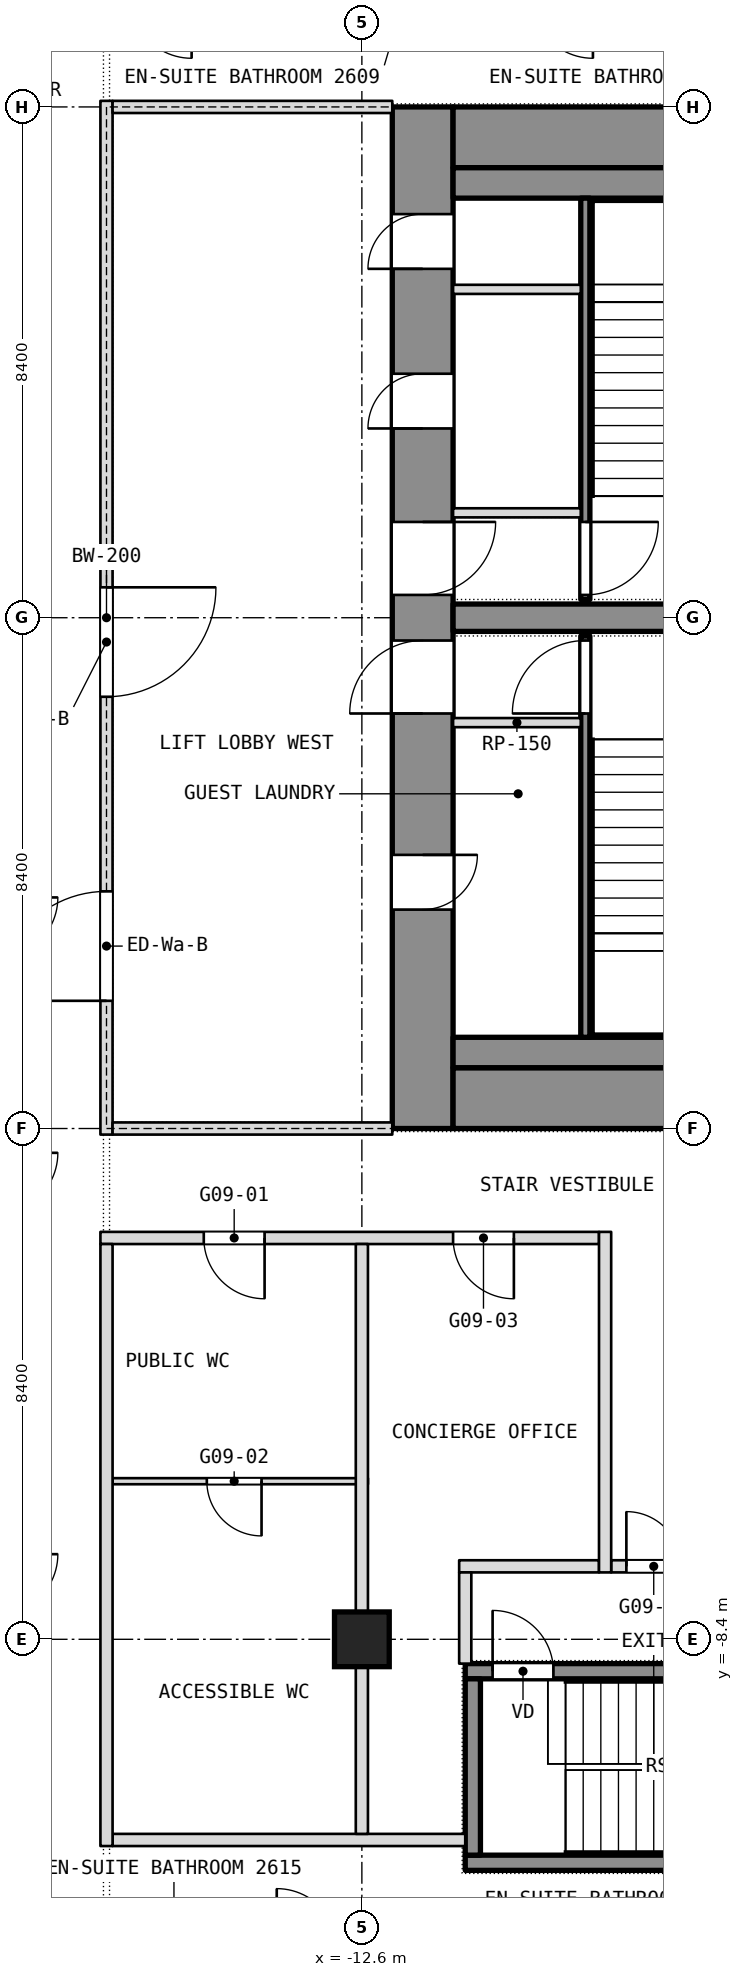
"""IFC4 building model, lengths in metres.
Left out: names, types, materials, properties, quantities, classifications, styles, units other than length and angle.
Written with IfcOpenShell. Run it as: python <this file> out.ifc"""

import sys

from ifc_helpers import new_model, si_unit, direction, frame, frame_2d, origin, origin_2d, place, context, subcontext, project, spatial, rectangle, extrude, element, fill, save


model = new_model("IFC4")
c1 = context("Model", 3, precision=1e-05, world=origin(), true_north=direction((0.0, 1.0)))
c2 = subcontext(c1, "Body", "Model", "MODEL_VIEW")
j1 = project(units=[si_unit("LENGTHUNIT", "METRE"), si_unit("PLANEANGLEUNIT", "RADIAN")], contexts=[c1])
p1 = place(None, origin())
s1 = spatial("IfcSite", under=j1, at=p1, CompositionType="ELEMENT")
p2 = place(p1, origin())
s2 = spatial("IfcBuilding", under=s1, at=p2, CompositionType="ELEMENT")
p3 = place(p2, frame((0.0, 0.0, 119.3)))
s3 = spatial("IfcBuildingStorey", under=s2, at=p3, CompositionType="ELEMENT", Elevation=119.3)
p4 = place(p3, frame((-11.6, 0.0, 0.0), z_axis=(0.0, 0.0, 1.0), x_axis=(0.0, 1.0, 0.0)))
e1 = element("IfcWall", 1, at=p4, inside=s3, PredefinedType="SHEAR", context=c2, shape_type="SweptSolid", body=[
    extrude(rectangle(XDim=16.8, YDim=1.0, at=frame_2d((8.4, 0.0))), origin(), (0.0, 0.0, 1.0), 3.6),
])
p5 = place(p4, frame((3.6, 0.0, 0.0)))
e2 = element("IfcOpeningElement", 2, at=p5, cuts=e1, PredefinedType="OPENING", context=c2, shape_type="SweptSolid", body=[
    extrude(rectangle(XDim=0.9, YDim=2.1, at=frame_2d((0.45, 1.05))), frame((0.0, 0.5, 0.0), z_axis=(0.0, -1.0, 0.0), x_axis=(1.0, 0.0, 0.0)), (0.0, 0.0, 1.0), 1.0),
])
p6 = place(p4, frame((6.825, 0.0, 0.0)))
e3 = element("IfcOpeningElement", 3, at=p6, cuts=e1, PredefinedType="OPENING", context=c2, shape_type="SweptSolid", body=[
    extrude(rectangle(XDim=1.2, YDim=2.1, at=frame_2d((0.6, 1.05))), frame((0.0, 0.5, 0.0), z_axis=(0.0, -1.0, 0.0), x_axis=(1.0, 0.0, 0.0)), (0.0, 0.0, 1.0), 1.0),
])
p7 = place(p4, frame((14.137, 0.0, 0.0)))
e4 = element("IfcOpeningElement", 4, at=p7, cuts=e1, PredefinedType="OPENING", context=c2, shape_type="SweptSolid", body=[
    extrude(rectangle(XDim=0.9, YDim=2.1, at=frame_2d((0.45, 1.05))), frame((0.0, 0.5, 0.0), z_axis=(0.0, -1.0, 0.0), x_axis=(1.0, 0.0, 0.0)), (0.0, 0.0, 1.0), 1.0),
])
p8 = place(p4, frame((11.512, 0.0, 0.0)))
e5 = element("IfcOpeningElement", 5, at=p8, cuts=e1, PredefinedType="OPENING", context=c2, shape_type="SweptSolid", body=[
    extrude(rectangle(XDim=0.9, YDim=2.1, at=frame_2d((0.45, 1.05))), frame((0.0, 0.5, 0.0), z_axis=(0.0, -1.0, 0.0), x_axis=(1.0, 0.0, 0.0)), (0.0, 0.0, 1.0), 1.0),
])
p9 = place(p4, frame((8.775, 0.0, 0.0)))
e6 = element("IfcOpeningElement", 6, at=p9, cuts=e1, PredefinedType="OPENING", context=c2, shape_type="SweptSolid", body=[
    extrude(rectangle(XDim=1.2, YDim=2.1, at=frame_2d((0.6, 1.05))), frame((0.0, 0.5, 0.0), z_axis=(0.0, -1.0, 0.0), x_axis=(1.0, 0.0, 0.0)), (0.0, 0.0, 1.0), 1.0),
])
for number, where, z_axis, x_axis in (
    (7, (-11.1, 0.5, 0.0), (0.0, 0.0, 1.0), (1.0, 0.0, 0.0)),
    (8, (-11.1, 16.3, 0.0), (0.0, 0.0, 1.0), (1.0, 0.0, 0.0)),
):
    element("IfcWall", number, at=place(p3, frame(where, z_axis=z_axis, x_axis=x_axis)), inside=s3, PredefinedType="SHEAR", context=c2, shape_type="SweptSolid", body=[
        extrude(rectangle(XDim=22.2, YDim=1.0, at=frame_2d((11.1, 0.0))), origin(), (0.0, 0.0, 1.0), 3.6),
    ])
p10 = place(p3, frame((-11.1, 8.4, 0.0), z_axis=(0.0, 0.0, 1.0), x_axis=(1.0, 0.0, 0.0)))
e9 = element("IfcWall", 9, at=p10, inside=s3, PredefinedType="SHEAR", context=c2, shape_type="SweptSolid", body=[
    extrude(rectangle(XDim=6.675, YDim=0.45, at=frame_2d((3.337, 0.0))), origin(), (0.0, 0.0, 1.0), 3.6),
])
p11 = place(p3, frame((-12.6, -8.4, 0.0), z_axis=(0.0, 0.0, 1.0), x_axis=(1.0, 0.0, 0.0)))
e10 = element("IfcColumn", 10, at=p11, inside=s3, PredefinedType="COLUMN", context=c2, shape_type="SweptSolid", body=[
    extrude(rectangle(XDim=0.9, YDim=0.9, at=origin_2d()), origin(), (0.0, 0.0, 1.0), 3.6),
])
p12 = place(p3, frame((-16.7, -11.7, 0.0), z_axis=(0.0, 0.0, 1.0), x_axis=(1.0, 0.0, 0.0)))
e11 = element("IfcWall", 11, at=p12, inside=s3, PredefinedType="PARTITIONING", context=c2, shape_type="SweptSolid", body=[
    extrude(rectangle(XDim=5.8, YDim=0.2, at=frame_2d((2.9, 0.0))), origin(), (0.0, 0.0, 1.0), 3.34),
])
p13 = place(p3, frame((-11.0, -7.2, 0.0), z_axis=(0.0, 0.0, 1.0), x_axis=(1.0, 0.0, 0.0)))
e12 = element("IfcWall", 12, at=p13, inside=s3, PredefinedType="PARTITIONING", context=c2, shape_type="SweptSolid", body=[
    extrude(rectangle(XDim=2.3, YDim=0.2, at=frame_2d((1.15, 0.0))), origin(), (0.0, 0.0, 1.0), 3.34),
])
p14 = place(p3, frame((-8.5, -7.2, 0.0), z_axis=(0.0, 0.0, 1.0), x_axis=(1.0, 0.0, 0.0)))
e13 = element("IfcWall", 13, at=p14, inside=s3, PredefinedType="PARTITIONING", context=c2, shape_type="SweptSolid", body=[
    extrude(rectangle(XDim=3.7, YDim=0.2, at=frame_2d((1.85, 0.0))), origin(), (0.0, 0.0, 1.0), 3.34),
])
p15 = place(p14, frame((0.25, 0.0, 0.0)))
e14 = element("IfcOpeningElement", 14, at=p15, cuts=e13, PredefinedType="OPENING", context=c2, shape_type="SweptSolid", body=[
    extrude(rectangle(XDim=0.9, YDim=2.1, at=frame_2d((0.45, 1.05))), frame((0.0, 0.1, 0.0), z_axis=(0.0, -1.0, 0.0), x_axis=(1.0, 0.0, 0.0)), (0.0, 0.0, 1.0), 0.2),
])
p16 = place(p3, frame((-16.7, -5.8, 0.0), z_axis=(0.0, 0.0, 1.0), x_axis=(1.0, 0.0, 0.0)))
e15 = element("IfcWall", 15, at=p16, inside=s3, PredefinedType="PARTITIONING", context=c2, shape_type="SweptSolid", body=[
    extrude(rectangle(XDim=4.2, YDim=0.1, at=frame_2d((2.1, 0.0))), origin(), (0.0, 0.0, 1.0), 3.34),
])
p17 = place(p16, frame((1.55, 0.0, 0.0)))
e16 = element("IfcOpeningElement", 16, at=p17, cuts=e15, PredefinedType="OPENING", context=c2, shape_type="SweptSolid", body=[
    extrude(rectangle(XDim=0.9, YDim=2.1, at=frame_2d((0.45, 1.05))), frame((0.0, 0.05, 0.0), z_axis=(0.0, -1.0, 0.0), x_axis=(1.0, 0.0, 0.0)), (0.0, 0.0, 1.0), 0.1),
])
p18 = place(p3, frame((-16.9, -1.8, 0.0), z_axis=(0.0, 0.0, 1.0), x_axis=(1.0, 0.0, 0.0)))
e17 = element("IfcWall", 17, at=p18, inside=s3, PredefinedType="PARTITIONING", context=c2, shape_type="SweptSolid", body=[
    extrude(rectangle(XDim=8.2, YDim=0.2, at=frame_2d((4.1, 0.0))), origin(), (0.0, 0.0, 1.0), 3.34),
])
p19 = place(p18, frame((1.7, 0.0, 0.0)))
e18 = element("IfcOpeningElement", 18, at=p19, cuts=e17, PredefinedType="OPENING", context=c2, shape_type="SweptSolid", body=[
    extrude(rectangle(XDim=1.0, YDim=2.1, at=frame_2d((0.5, 1.05))), frame((0.0, 0.1, 0.0), z_axis=(0.0, -1.0, 0.0), x_axis=(1.0, 0.0, 0.0)), (0.0, 0.0, 1.0), 0.2),
])
p20 = place(p18, frame((5.8, 0.0, 0.0)))
e19 = element("IfcOpeningElement", 19, at=p20, cuts=e17, PredefinedType="OPENING", context=c2, shape_type="SweptSolid", body=[
    extrude(rectangle(XDim=1.0, YDim=2.1, at=frame_2d((0.5, 1.05))), frame((0.0, 0.1, 0.0), z_axis=(0.0, -1.0, 0.0), x_axis=(1.0, 0.0, 0.0)), (0.0, 0.0, 1.0), 0.2),
])
p21 = place(p3, frame((-8.6, -7.3, 0.0), z_axis=(0.0, 0.0, 1.0), x_axis=(0.0, 1.0, 0.0)))
e20 = element("IfcWall", 20, at=p21, inside=s3, PredefinedType="PARTITIONING", context=c2, shape_type="SweptSolid", body=[
    extrude(rectangle(XDim=5.6, YDim=0.2, at=frame_2d((2.8, 0.0))), origin(), (0.0, 0.0, 1.0), 3.34),
])
p22 = place(p3, frame((-10.9, -8.8, 0.0), z_axis=(0.0, 0.0, 1.0), x_axis=(0.0, 1.0, 0.0)))
e21 = element("IfcWall", 21, at=p22, inside=s3, PredefinedType="PARTITIONING", context=c2, shape_type="SweptSolid", body=[
    extrude(rectangle(XDim=1.5, YDim=0.2, at=frame_2d((0.75, 0.0))), origin(), (0.0, 0.0, 1.0), 3.34),
])
p23 = place(p3, frame((-12.6, -11.6, 0.0), z_axis=(0.0, 0.0, 1.0), x_axis=(0.0, 1.0, 0.0)))
e22 = element("IfcWall", 22, at=p23, inside=s3, PredefinedType="PARTITIONING", context=c2, shape_type="SweptSolid", body=[
    extrude(rectangle(XDim=9.7, YDim=0.2, at=frame_2d((4.85, 0.0))), origin(), (0.0, 0.0, 1.0), 3.34),
])
p24 = place(p3, frame((-16.8, -11.8, 0.0), z_axis=(0.0, 0.0, 1.0), x_axis=(0.0, 1.0, 0.0)))
e23 = element("IfcWall", 23, at=p24, inside=s3, PredefinedType="PARTITIONING", context=c2, shape_type="SweptSolid", body=[
    extrude(rectangle(XDim=9.9, YDim=0.2, at=frame_2d((4.95, 0.0))), origin(), (0.0, 0.0, 1.0), 3.34),
])
for number, where, z_axis, x_axis in (
    (24, (-11.1, 1.25, 0.0), (0.0, 0.0, 1.0), (1.0, 0.0, 0.0)),
    (25, (-11.1, 15.55, 0.0), (0.0, 0.0, 1.0), (1.0, 0.0, 0.0)),
):
    element("IfcWall", number, at=place(p3, frame(where, z_axis=z_axis, x_axis=x_axis)), inside=s3, PredefinedType="PARTITIONING", context=c2, shape_type="SweptSolid", body=[
        extrude(rectangle(XDim=22.2, YDim=0.5, at=frame_2d((11.1, 0.0))), origin(), (0.0, 0.0, 1.0), 3.34),
    ])
p25 = place(p3, frame((-8.925, 1.5, 0.0), z_axis=(0.0, 0.0, 1.0), x_axis=(0.0, 1.0, 0.0)))
e26 = element("IfcWall", 26, at=p25, inside=s3, PredefinedType="SHEAR", context=c2, shape_type="SweptSolid", body=[
    extrude(rectangle(XDim=6.6, YDim=0.15, at=frame_2d((3.3, 0.0))), origin(), (0.0, 0.0, 1.0), 3.34),
])
p26 = place(p25, frame((5.325, 0.0, 0.0)))
e27 = element("IfcOpeningElement", 27, at=p26, cuts=e26, PredefinedType="OPENING", context=c2, shape_type="SweptSolid", body=[
    extrude(rectangle(XDim=1.2, YDim=2.1, at=frame_2d((0.6, 1.05))), frame((0.0, 0.075, 0.0), z_axis=(0.0, -1.0, 0.0), x_axis=(1.0, 0.0, 0.0)), (0.0, 0.0, 1.0), 0.15),
])
p27 = place(p3, frame((-11.1, 6.675, 0.0), z_axis=(0.0, 0.0, 1.0), x_axis=(1.0, 0.0, 0.0)))
e28 = element("IfcWall", 28, at=p27, inside=s3, PredefinedType="PARTITIONING", context=c2, shape_type="SweptSolid", body=[
    extrude(rectangle(XDim=2.1, YDim=0.15, at=frame_2d((1.05, 0.0))), origin(), (0.0, 0.0, 1.0), 3.34),
])
p28 = place(p3, frame((-8.925, 8.7, 0.0), z_axis=(0.0, 0.0, 1.0), x_axis=(0.0, 1.0, 0.0)))
e29 = element("IfcWall", 29, at=p28, inside=s3, PredefinedType="SHEAR", context=c2, shape_type="SweptSolid", body=[
    extrude(rectangle(XDim=6.6, YDim=0.15, at=frame_2d((3.3, 0.0))), origin(), (0.0, 0.0, 1.0), 3.34),
])
p29 = place(p28, frame((0.075, 0.0, 0.0)))
e30 = element("IfcOpeningElement", 30, at=p29, cuts=e29, PredefinedType="OPENING", context=c2, shape_type="SweptSolid", body=[
    extrude(rectangle(XDim=1.2, YDim=2.1, at=frame_2d((0.6, 1.05))), frame((0.0, 0.075, 0.0), z_axis=(0.0, -1.0, 0.0), x_axis=(1.0, 0.0, 0.0)), (0.0, 0.0, 1.0), 0.15),
])
for number, where, z_axis, x_axis in (
    (31, (-11.1, 10.125, 0.0), (0.0, 0.0, 1.0), (1.0, 0.0, 0.0)),
    (32, (-11.1, 13.8, 0.0), (0.0, 0.0, 1.0), (1.0, 0.0, 0.0)),
):
    element("IfcWall", number, at=place(p3, frame(where, z_axis=z_axis, x_axis=x_axis)), inside=s3, PredefinedType="PARTITIONING", context=c2, shape_type="SweptSolid", body=[
        extrude(rectangle(XDim=2.1, YDim=0.15, at=frame_2d((1.05, 0.0))), origin(), (0.0, 0.0, 1.0), 3.34),
    ])
p30 = place(p3, frame((-16.8, -0.1, 0.0), z_axis=(0.0, 0.0, 1.0), x_axis=(0.0, 1.0, 0.0)))
e33 = element("IfcWall", 33, at=p30, inside=s3, PredefinedType="PARTITIONING", context=c2, shape_type="SweptSolid", body=[
    extrude(rectangle(XDim=17.0, YDim=0.2, at=frame_2d((8.5, 0.0))), origin(), (0.0, 0.0, 1.0), 3.34),
])
p31 = place(p30, frame((2.2, 0.0, 0.0)))
e34 = element("IfcOpeningElement", 34, at=p31, cuts=e33, PredefinedType="OPENING", context=c2, shape_type="SweptSolid", body=[
    extrude(rectangle(XDim=1.8, YDim=2.1, at=frame_2d((0.9, 1.05))), frame((0.0, 0.1, 0.0), z_axis=(0.0, -1.0, 0.0), x_axis=(1.0, 0.0, 0.0)), (0.0, 0.0, 1.0), 0.2),
])
p32 = place(p30, frame((7.2, 0.0, 0.0)))
e35 = element("IfcOpeningElement", 35, at=p32, cuts=e33, PredefinedType="OPENING", context=c2, shape_type="SweptSolid", body=[
    extrude(rectangle(XDim=1.8, YDim=2.1, at=frame_2d((0.9, 1.05))), frame((0.0, 0.1, 0.0), z_axis=(0.0, -1.0, 0.0), x_axis=(1.0, 0.0, 0.0)), (0.0, 0.0, 1.0), 0.2),
])
for number, where, z_axis, x_axis in (
    (36, (-16.7, 0.0, 0.0), (0.0, 0.0, 1.0), (1.0, 0.0, 0.0)),
    (37, (-16.7, 16.8, 0.0), (0.0, 0.0, 1.0), (1.0, 0.0, 0.0)),
):
    element("IfcWall", number, at=place(p3, frame(where, z_axis=z_axis, x_axis=x_axis)), inside=s3, PredefinedType="PARTITIONING", context=c2, shape_type="SweptSolid", body=[
        extrude(rectangle(XDim=4.6, YDim=0.2, at=frame_2d((2.3, 0.0))), origin(), (0.0, 0.0, 1.0), 2.89),
    ])
p33 = place(p3, frame((-10.9, -12.075, 0.1), z_axis=(0.0, 0.0, 1.0), x_axis=(1.0, 0.0, 0.0)))
e38 = element("IfcWall", 38, at=p33, inside=s3, PredefinedType="SHEAR", context=c2, shape_type="SweptSolid", body=[
    extrude(rectangle(XDim=6.2, YDim=0.25, at=frame_2d((3.1, 0.0))), origin(), (0.0, 0.0, 1.0), 3.6),
])
p34 = place(p3, frame((-10.9, -8.925, 0.1), z_axis=(0.0, 0.0, 1.0), x_axis=(1.0, 0.0, 0.0)))
e39 = element("IfcWall", 39, at=p34, inside=s3, PredefinedType="SHEAR", context=c2, shape_type="SweptSolid", body=[
    extrude(rectangle(XDim=6.2, YDim=0.25, at=frame_2d((3.1, 0.0))), origin(), (0.0, 0.0, 1.0), 3.6),
])
p35 = place(p34, frame((0.45, 0.0, 0.0)))
e40 = element("IfcOpeningElement", 40, at=p35, cuts=e39, PredefinedType="OPENING", context=c2, shape_type="SweptSolid", body=[
    extrude(rectangle(XDim=1.0, YDim=2.1, at=frame_2d((0.5, 1.05))), frame((0.0, 0.125, 0.0), z_axis=(0.0, -1.0, 0.0), x_axis=(1.0, 0.0, 0.0)), (0.0, 0.0, 1.0), 0.25),
])
p36 = place(p3, frame((-10.775, -11.95, 0.1), z_axis=(0.0, 0.0, 1.0), x_axis=(0.0, 1.0, 0.0)))
e41 = element("IfcWall", 41, at=p36, inside=s3, PredefinedType="SHEAR", context=c2, shape_type="SweptSolid", body=[
    extrude(rectangle(XDim=2.9, YDim=0.25, at=frame_2d((1.45, 0.0))), origin(), (0.0, 0.0, 1.0), 3.6),
])
p37 = place(p15, origin())
e42 = element("IfcDoor", 42, at=p37, inside=s3, OperationType="SINGLE_SWING_RIGHT", PredefinedType="DOOR", context=c2, shape_type="SweptSolid", body=[
    extrude(rectangle(XDim=0.9, YDim=2.1, at=frame_2d((0.45, 1.05))), frame((0.0, 0.025, 0.0), z_axis=(0.0, -1.0, 0.0), x_axis=(1.0, 0.0, 0.0)), (0.0, 0.0, 1.0), 0.05),
])
fill(e14, e42)
p38 = place(p17, origin())
e43 = element("IfcDoor", 43, at=p38, inside=s3, OperationType="SINGLE_SWING_RIGHT", PredefinedType="DOOR", context=c2, shape_type="SweptSolid", body=[
    extrude(rectangle(XDim=0.9, YDim=2.1, at=frame_2d((0.45, 1.05))), frame((0.0, 0.025, 0.0), z_axis=(0.0, -1.0, 0.0), x_axis=(1.0, 0.0, 0.0)), (0.0, 0.0, 1.0), 0.05),
])
fill(e16, e43)
p39 = place(p19, origin())
e44 = element("IfcDoor", 44, at=p39, inside=s3, OperationType="SINGLE_SWING_LEFT", PredefinedType="DOOR", context=c2, shape_type="SweptSolid", body=[
    extrude(rectangle(XDim=1.0, YDim=2.1, at=frame_2d((0.5, 1.05))), frame((0.0, 0.025, 0.0), z_axis=(0.0, -1.0, 0.0), x_axis=(1.0, 0.0, 0.0)), (0.0, 0.0, 1.0), 0.05),
])
fill(e18, e44)
p40 = place(p20, origin())
e45 = element("IfcDoor", 45, at=p40, inside=s3, OperationType="SINGLE_SWING_LEFT", PredefinedType="DOOR", context=c2, shape_type="SweptSolid", body=[
    extrude(rectangle(XDim=1.0, YDim=2.1, at=frame_2d((0.5, 1.05))), frame((0.0, 0.025, 0.0), z_axis=(0.0, -1.0, 0.0), x_axis=(1.0, 0.0, 0.0)), (0.0, 0.0, 1.0), 0.05),
])
fill(e19, e45)
p41 = place(p35, origin())
e46 = element("IfcDoor", 46, at=p41, inside=s3, OperationType="SINGLE_SWING_LEFT", PredefinedType="DOOR", context=c2, shape_type="SweptSolid", body=[
    extrude(rectangle(XDim=1.0, YDim=2.1, at=frame_2d((0.5, 1.05))), frame((0.0, 0.025, 0.0), z_axis=(0.0, -1.0, 0.0), x_axis=(1.0, 0.0, 0.0)), (0.0, 0.0, 1.0), 0.05),
])
fill(e40, e46)
p42 = place(p5, origin())
e47 = element("IfcDoor", 47, at=p42, inside=s3, OperationType="SINGLE_SWING_LEFT", PredefinedType="DOOR", context=c2, shape_type="SweptSolid", body=[
    extrude(rectangle(XDim=0.9, YDim=2.1, at=frame_2d((0.45, 1.05))), frame((0.0, 0.025, 0.0), z_axis=(0.0, -1.0, 0.0), x_axis=(1.0, 0.0, 0.0)), (0.0, 0.0, 1.0), 0.05),
])
fill(e2, e47)
p43 = place(p6, origin())
e48 = element("IfcDoor", 48, at=p43, inside=s3, OperationType="SINGLE_SWING_LEFT", PredefinedType="DOOR", context=c2, shape_type="SweptSolid", body=[
    extrude(rectangle(XDim=1.2, YDim=2.1, at=frame_2d((0.6, 1.05))), frame((0.0, 0.025, 0.0), z_axis=(0.0, -1.0, 0.0), x_axis=(1.0, 0.0, 0.0)), (0.0, 0.0, 1.0), 0.05),
])
fill(e3, e48)
p44 = place(p26, origin())
e49 = element("IfcDoor", 49, at=p44, inside=s3, OperationType="SINGLE_SWING_LEFT", PredefinedType="DOOR", context=c2, shape_type="SweptSolid", body=[
    extrude(rectangle(XDim=1.2, YDim=2.1, at=frame_2d((0.6, 1.05))), frame((0.0, 0.025, 0.0), z_axis=(0.0, -1.0, 0.0), x_axis=(1.0, 0.0, 0.0)), (0.0, 0.0, 1.0), 0.05),
])
fill(e27, e49)
p45 = place(p7, origin())
e50 = element("IfcDoor", 50, at=p45, inside=s3, OperationType="SINGLE_SWING_LEFT", PredefinedType="DOOR", context=c2, shape_type="SweptSolid", body=[
    extrude(rectangle(XDim=0.9, YDim=2.1, at=frame_2d((0.45, 1.05))), frame((0.0, 0.025, 0.0), z_axis=(0.0, -1.0, 0.0), x_axis=(1.0, 0.0, 0.0)), (0.0, 0.0, 1.0), 0.05),
])
fill(e4, e50)
p46 = place(p8, origin())
e51 = element("IfcDoor", 51, at=p46, inside=s3, OperationType="SINGLE_SWING_LEFT", PredefinedType="DOOR", context=c2, shape_type="SweptSolid", body=[
    extrude(rectangle(XDim=0.9, YDim=2.1, at=frame_2d((0.45, 1.05))), frame((0.0, 0.025, 0.0), z_axis=(0.0, -1.0, 0.0), x_axis=(1.0, 0.0, 0.0)), (0.0, 0.0, 1.0), 0.05),
])
fill(e5, e51)
p47 = place(p9, origin())
e52 = element("IfcDoor", 52, at=p47, inside=s3, OperationType="SINGLE_SWING_LEFT", PredefinedType="DOOR", context=c2, shape_type="SweptSolid", body=[
    extrude(rectangle(XDim=1.2, YDim=2.1, at=frame_2d((0.6, 1.05))), frame((0.0, 0.025, 0.0), z_axis=(0.0, -1.0, 0.0), x_axis=(1.0, 0.0, 0.0)), (0.0, 0.0, 1.0), 0.05),
])
fill(e6, e52)
p48 = place(p29, origin())
e53 = element("IfcDoor", 53, at=p48, inside=s3, OperationType="SINGLE_SWING_LEFT", PredefinedType="DOOR", context=c2, shape_type="SweptSolid", body=[
    extrude(rectangle(XDim=1.2, YDim=2.1, at=frame_2d((0.6, 1.05))), frame((0.0, 0.025, 0.0), z_axis=(0.0, -1.0, 0.0), x_axis=(1.0, 0.0, 0.0)), (0.0, 0.0, 1.0), 0.05),
])
fill(e30, e53)
p49 = place(p31, origin())
e54 = element("IfcDoor", 54, at=p49, inside=s3, OperationType="DOUBLE_DOOR_SINGLE_SWING", PredefinedType="DOOR", context=c2, shape_type="SweptSolid", body=[
    extrude(rectangle(XDim=1.8, YDim=2.1, at=frame_2d((0.9, 1.05))), frame((0.0, 0.025, 0.0), z_axis=(0.0, -1.0, 0.0), x_axis=(1.0, 0.0, 0.0)), (0.0, 0.0, 1.0), 0.05),
])
fill(e34, e54)
p50 = place(p32, origin())
e55 = element("IfcDoor", 55, at=p50, inside=s3, OperationType="DOUBLE_DOOR_SINGLE_SWING", PredefinedType="DOOR", context=c2, shape_type="SweptSolid", body=[
    extrude(rectangle(XDim=1.8, YDim=2.1, at=frame_2d((0.9, 1.05))), frame((0.0, 0.025, 0.0), z_axis=(0.0, -1.0, 0.0), x_axis=(1.0, 0.0, 0.0)), (0.0, 0.0, 1.0), 0.05),
])
fill(e35, e55)
save(model, sys.argv[1])
